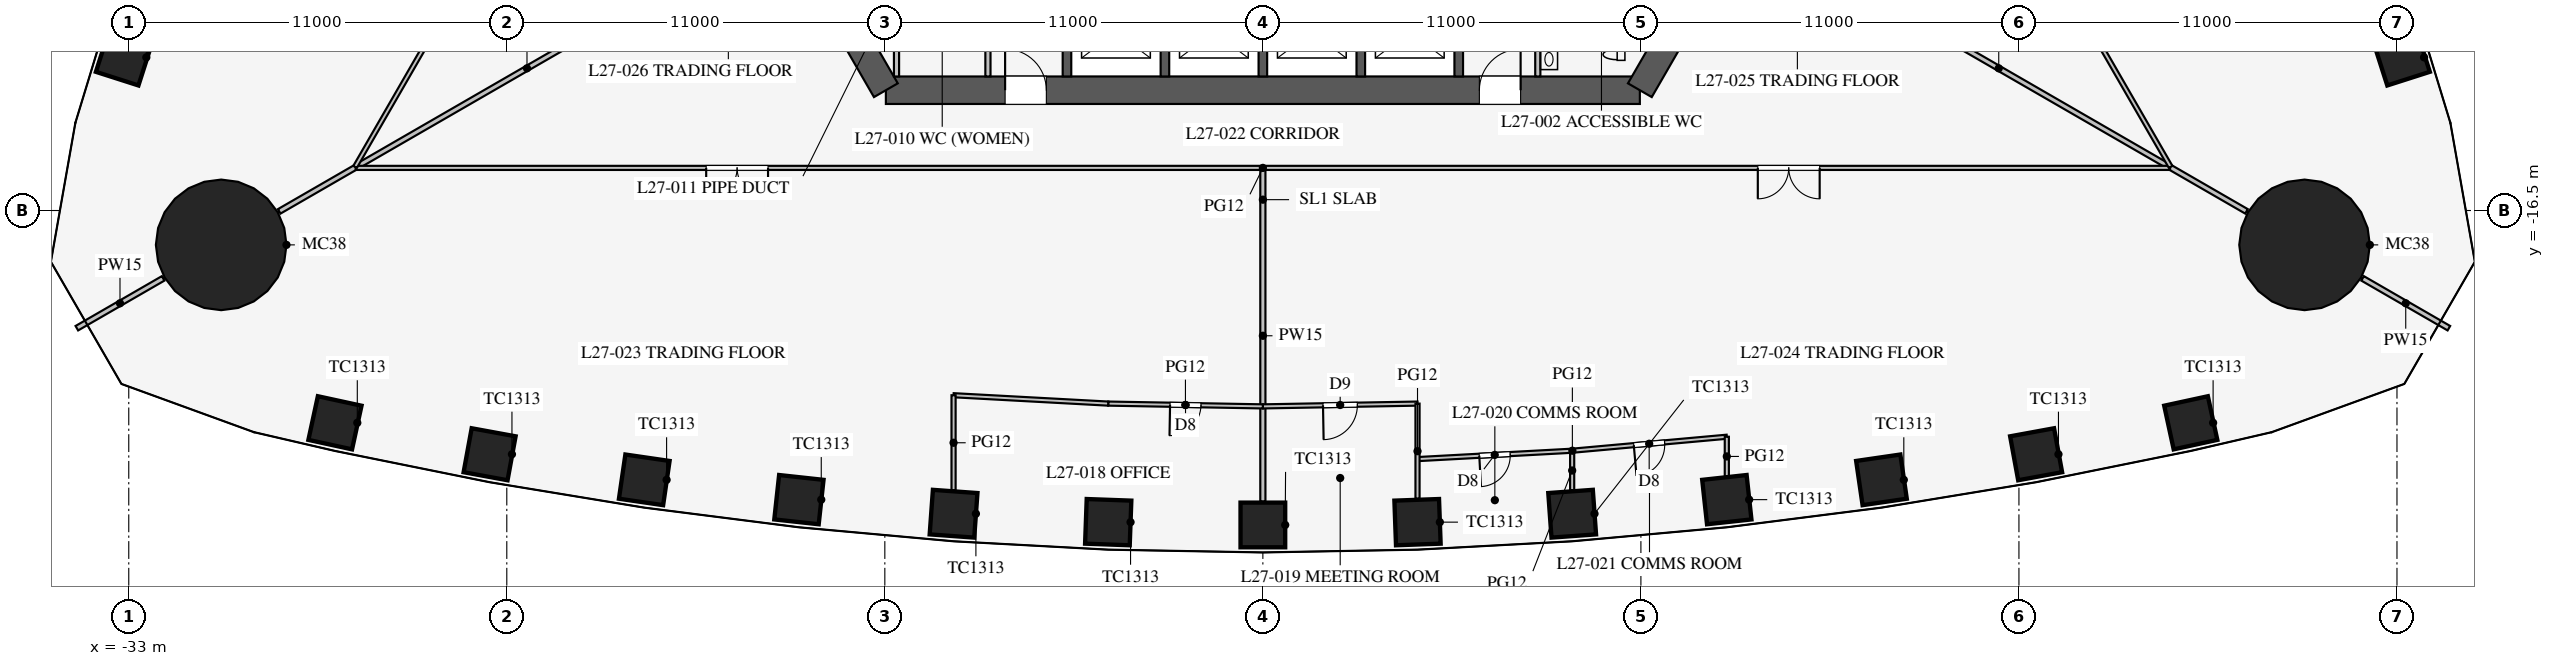
"""IFC4 building model, lengths in metres.
Left out: names, types, materials, properties, quantities, classifications, styles, units other than length and angle.
Written with IfcOpenShell. Run it as: python <this file> out.ifc"""

import sys

from ifc_helpers import new_model, si_unit, direction, frame, frame_2d, origin, origin_2d, place, context, subcontext, project, spatial, rectangle, circle, extrude, element, fill, save


model = new_model("IFC4")
c1 = context("Model", 3, precision=1e-05, world=origin(), true_north=direction((0.0, 1.0)))
c2 = subcontext(c1, "Body", "Model", "MODEL_VIEW")
j1 = project(units=[si_unit("LENGTHUNIT", "METRE"), si_unit("PLANEANGLEUNIT", "RADIAN")], contexts=[c1])
p1 = place(None, origin())
s1 = spatial("IfcSite", under=j1, at=p1, CompositionType="ELEMENT")
p2 = place(p1, origin())
s2 = spatial("IfcBuilding", under=s1, at=p2, CompositionType="ELEMENT")
p3 = place(p2, frame((0.0, 0.0, 119.9)))
s3 = spatial("IfcBuildingStorey", under=s2, at=p3, CompositionType="ELEMENT", Elevation=119.9)
for number, where, z_axis, x_axis in (
    (1, (-27.0, -22.677, 0.0), (0.0, 0.0, 1.0), (0.977, -0.212, 0.0)),
    (2, (-22.5, -23.593, 0.0), (0.0, 0.0, 1.0), (0.984, -0.18, 0.0)),
    (3, (-18.0, -24.337, 0.0), (0.0, 0.0, 1.0), (0.99, -0.144, 0.0)),
    (4, (-13.5, -24.913, 0.0), (0.0, 0.0, 1.0), (0.994, -0.108, 0.0)),
    (5, (-9.0, -25.323, 0.0), (0.0, 0.0, 1.0), (0.997, -0.072, 0.0)),
    (6, (-4.5, -25.568, 0.0), (0.0, 0.0, 1.0), (0.999, -0.036, 0.0)),
    (7, (0.0, -25.65, 0.0), (0.0, 0.0, 1.0), (1.0, 0.0, 0.0)),
    (8, (4.5, -25.568, 0.0), (0.0, 0.0, 1.0), (0.999, 0.036, 0.0)),
    (9, (9.0, -25.323, 0.0), (0.0, 0.0, 1.0), (0.997, 0.072, 0.0)),
    (10, (13.5, -24.913, 0.0), (0.0, 0.0, 1.0), (0.994, 0.108, 0.0)),
    (11, (18.0, -24.337, 0.0), (0.0, 0.0, 1.0), (0.99, 0.144, 0.0)),
    (12, (22.5, -23.593, 0.0), (0.0, 0.0, 1.0), (0.984, 0.18, 0.0)),
    (13, (27.0, -22.677, 0.0), (0.0, 0.0, 1.0), (0.977, 0.212, 0.0)),
    (14, (33.139, -12.044, 0.0), (0.0, 0.0, 1.0), (-0.305, 0.952, 0.0)),
    (15, (-33.139, -12.044, 0.0), (0.0, 0.0, 1.0), (-0.305, -0.952, 0.0)),
):
    element("IfcColumn", number, at=place(p3, frame(where, z_axis=z_axis, x_axis=x_axis)), inside=s3, PredefinedType="COLUMN", context=c2, shape_type="SweptSolid", body=[
        extrude(rectangle(XDim=1.3, YDim=1.3, at=origin_2d()), origin(), (0.0, 0.0, 1.0), 4.2),
    ])
for number, where, z_axis, x_axis in (
    (16, (30.311, -17.5, 0.0), (0.0, 0.0, 1.0), (1.0, 0.0, 0.0)),
    (17, (-30.311, -17.5, 0.0), (0.0, 0.0, 1.0), (1.0, 0.0, 0.0)),
):
    element("IfcColumn", number, at=place(p3, frame(where, z_axis=z_axis, x_axis=x_axis)), inside=s3, PredefinedType="COLUMN", context=c2, shape_type="SweptSolid", body=[
        extrude(circle(Radius=1.9, at=origin_2d()), origin(), (0.0, 0.0, 1.0), 4.2),
    ])
p4 = place(p3, frame((-10.97, -13.0, 0.0), z_axis=(0.0, 0.0, 1.0), x_axis=(1.0, 0.0, 0.0)))
e18 = element("IfcWall", 18, at=p4, inside=s3, PredefinedType="SHEAR", context=c2, shape_type="SweptSolid", body=[
    extrude(rectangle(XDim=21.939, YDim=0.8, at=frame_2d((10.97, 0.0))), origin(), (0.0, 0.0, 1.0), 4.2),
])
p5 = place(p4, frame((17.27, 0.0, 0.0)))
e19 = element("IfcOpeningElement", 19, at=p5, cuts=e18, PredefinedType="OPENING", context=c2, shape_type="SweptSolid", body=[
    extrude(rectangle(XDim=1.2, YDim=2.1, at=frame_2d((0.6, 1.05))), frame((0.0, 0.41, 0.0), z_axis=(0.0, -1.0, 0.0), x_axis=(1.0, 0.0, 0.0)), (0.0, 0.0, 1.0), 0.82),
])
p6 = place(p4, frame((3.47, 0.0, 0.0)))
e20 = element("IfcOpeningElement", 20, at=p6, cuts=e18, PredefinedType="OPENING", context=c2, shape_type="SweptSolid", body=[
    extrude(rectangle(XDim=1.2, YDim=2.1, at=frame_2d((0.6, 1.05))), frame((0.0, 0.41, 0.0), z_axis=(0.0, -1.0, 0.0), x_axis=(1.0, 0.0, 0.0)), (0.0, 0.0, 1.0), 0.82),
])
for number, where, z_axis, x_axis in (
    (21, (10.97, -13.0, 0.0), (0.0, 0.0, 1.0), (0.5, 0.866, 0.0)),
    (22, (-16.743, -3.0, 0.0), (0.0, 0.0, 1.0), (0.5, -0.866, 0.0)),
):
    element("IfcWall", number, at=place(p3, frame(where, z_axis=z_axis, x_axis=x_axis)), inside=s3, PredefinedType="SHEAR", context=c2, shape_type="SweptSolid", body=[
        extrude(rectangle(XDim=11.547, YDim=0.8, at=frame_2d((5.773, 0.0))), origin(), (0.0, 0.0, 1.0), 4.2),
    ])
for number, where, z_axis, x_axis in (
    (23, (-5.7, -10.025, 0.0), (0.0, 0.0, 1.0), (0.0, -1.0, 0.0)),
    (24, (-2.85, -10.025, 0.0), (0.0, 0.0, 1.0), (0.0, -1.0, 0.0)),
    (25, (0.0, -10.025, 0.0), (0.0, 0.0, 1.0), (0.0, -1.0, 0.0)),
    (26, (2.85, -10.025, 0.0), (0.0, 0.0, 1.0), (0.0, -1.0, 0.0)),
    (27, (5.7, -10.025, 0.0), (0.0, 0.0, 1.0), (0.0, -1.0, 0.0)),
):
    element("IfcWall", number, at=place(p3, frame(where, z_axis=z_axis, x_axis=x_axis)), inside=s3, PredefinedType="SHEAR", context=c2, shape_type="SweptSolid", body=[
        extrude(rectangle(XDim=2.575, YDim=0.25, at=frame_2d((1.288, 0.0))), origin(), (0.0, 0.0, 1.0), 4.2),
    ])
p7 = place(p3, frame((8.0, -7.5, 0.0), z_axis=(0.0, 0.0, 1.0), x_axis=(0.0, -1.0, 0.0)))
e28 = element("IfcWall", 28, at=p7, inside=s3, PredefinedType="PARTITIONING", context=c2, shape_type="SweptSolid", body=[
    extrude(rectangle(XDim=5.1, YDim=0.15, at=frame_2d((2.55, 0.0))), origin(), (0.0, 0.0, 1.0), 4.0),
])
p8 = place(p7, frame((2.6, 0.0, 0.0)))
e29 = element("IfcOpeningElement", 29, at=p8, cuts=e28, PredefinedType="OPENING", context=c2, shape_type="SweptSolid", body=[
    extrude(rectangle(XDim=0.9, YDim=2.1, at=frame_2d((0.45, 1.05))), frame((0.0, 0.085, 0.0), z_axis=(0.0, -1.0, 0.0), x_axis=(1.0, 0.0, 0.0)), (0.0, 0.0, 1.0), 0.17),
])
p9 = place(p3, frame((-8.0, -7.5, 0.0), z_axis=(0.0, 0.0, 1.0), x_axis=(0.0, -1.0, 0.0)))
e30 = element("IfcWall", 30, at=p9, inside=s3, PredefinedType="PARTITIONING", context=c2, shape_type="SweptSolid", body=[
    extrude(rectangle(XDim=5.1, YDim=0.15, at=frame_2d((2.55, 0.0))), origin(), (0.0, 0.0, 1.0), 4.0),
])
p10 = place(p9, frame((2.6, 0.0, 0.0)))
e31 = element("IfcOpeningElement", 31, at=p10, cuts=e30, PredefinedType="OPENING", context=c2, shape_type="SweptSolid", body=[
    extrude(rectangle(XDim=0.9, YDim=2.1, at=frame_2d((0.45, 1.05))), frame((0.0, 0.085, 0.0), z_axis=(0.0, -1.0, 0.0), x_axis=(1.0, 0.0, 0.0)), (0.0, 0.0, 1.0), 0.17),
])
p11 = place(p3, frame((-10.66, -8.5, 0.0), z_axis=(0.0, 0.0, 1.0), x_axis=(0.0, -1.0, 0.0)))
e32 = element("IfcWall", 32, at=p11, inside=s3, PredefinedType="PARTITIONING", context=c2, shape_type="SweptSolid", body=[
    extrude(rectangle(XDim=4.1, YDim=0.15, at=frame_2d((2.05, 0.0))), origin(), (0.0, 0.0, 1.0), 4.0),
])
p12 = place(p3, frame((14.203, -8.2, 0.0), z_axis=(0.0, 0.0, 1.0), x_axis=(0.866024668836, -0.500001272966, 0.0)))
e33 = element("IfcWall", 33, at=p12, inside=s3, PredefinedType="PARTITIONING", context=c2, shape_type="SweptSolid", body=[
    extrude(rectangle(XDim=16.65, YDim=0.15, at=frame_2d((8.325, 0.0))), origin(), (0.0, 0.0, 1.0), 2.3),
])
p13 = place(p3, frame((32.0, -18.475, 0.0), z_axis=(0.0, 0.0, 1.0), x_axis=(0.866042548026, -0.499970304126, 0.0)))
e34 = element("IfcWall", 34, at=p13, inside=s3, PredefinedType="PARTITIONING", context=c2, shape_type="SweptSolid", body=[
    extrude(rectangle(XDim=2.899, YDim=0.15, at=frame_2d((1.45, 0.0))), origin(), (0.0, 0.0, 1.0), 2.3),
])
p14 = place(p3, frame((-14.203, -8.2, 0.0), z_axis=(0.0, 0.0, 1.0), x_axis=(-0.866024668836, -0.500001272966, 0.0)))
e35 = element("IfcWall", 35, at=p14, inside=s3, PredefinedType="PARTITIONING", context=c2, shape_type="SweptSolid", body=[
    extrude(rectangle(XDim=16.65, YDim=0.15, at=frame_2d((8.325, 0.0))), origin(), (0.0, 0.0, 1.0), 2.3),
])
p15 = place(p3, frame((-32.0, -18.475, 0.0), z_axis=(0.0, 0.0, 1.0), x_axis=(-0.866042548026, -0.499970304126, 0.0)))
e36 = element("IfcWall", 36, at=p15, inside=s3, PredefinedType="PARTITIONING", context=c2, shape_type="SweptSolid", body=[
    extrude(rectangle(XDim=2.899, YDim=0.15, at=frame_2d((1.45, 0.0))), origin(), (0.0, 0.0, 1.0), 2.3),
])
p16 = place(p3, frame((0.0, -15.32, 0.0), z_axis=(0.0, 0.0, 1.0), x_axis=(0.0, -1.0, 0.0)))
e37 = element("IfcWall", 37, at=p16, inside=s3, PredefinedType="PARTITIONING", context=c2, shape_type="SweptSolid", body=[
    extrude(rectangle(XDim=9.65, YDim=0.15, at=frame_2d((4.825, 0.0))), origin(), (0.0, 0.0, 1.0), 3.2),
])
p17 = place(p3, frame((-26.398, -15.26, 0.0), z_axis=(0.0, 0.0, 1.0), x_axis=(1.0, 0.0, 0.0)))
e38 = element("IfcWall", 38, at=p17, inside=s3, PredefinedType="PARTITIONING", context=c2, shape_type="SweptSolid", body=[
    extrude(rectangle(XDim=52.796, YDim=0.12, at=frame_2d((26.398, 0.0))), origin(), (0.0, 0.0, 1.0), 2.9),
])
p18 = place(p17, frame((10.2, 0.0, 0.15)))
e39 = element("IfcOpeningElement", 39, at=p18, cuts=e38, PredefinedType="OPENING", context=c2, shape_type="SweptSolid", body=[
    extrude(rectangle(XDim=1.8, YDim=2.1, at=frame_2d((0.9, 1.05))), frame((0.0, 0.07, 0.0), z_axis=(0.0, -1.0, 0.0), x_axis=(1.0, 0.0, 0.0)), (0.0, 0.0, 1.0), 0.14),
])
p19 = place(p17, frame((40.8, 0.0, 0.15)))
e40 = element("IfcOpeningElement", 40, at=p19, cuts=e38, PredefinedType="OPENING", context=c2, shape_type="SweptSolid", body=[
    extrude(rectangle(XDim=1.8, YDim=2.1, at=frame_2d((0.9, 1.05))), frame((0.0, 0.07, 0.0), z_axis=(0.0, -1.0, 0.0), x_axis=(1.0, 0.0, 0.0)), (0.0, 0.0, 1.0), 0.14),
])
p20 = place(p3, frame((0.0, -22.2, 0.0), z_axis=(0.0, 0.0, 1.0), x_axis=(0.999837820638, 0.018009231578, 0.0)))
e41 = element("IfcWall", 41, at=p20, inside=s3, PredefinedType="PARTITIONING", context=c2, shape_type="SweptSolid", body=[
    extrude(rectangle(XDim=4.501, YDim=0.12, at=frame_2d((2.25, 0.0))), origin(), (0.0, 0.0, 1.0), 2.9),
])
p21 = place(p20, frame((1.75, 0.0, 0.15)))
e42 = element("IfcOpeningElement", 42, at=p21, cuts=e41, PredefinedType="OPENING", context=c2, shape_type="SweptSolid", body=[
    extrude(rectangle(XDim=1.0, YDim=2.1, at=frame_2d((0.5, 1.05))), frame((0.0, 0.07, 0.0), z_axis=(0.0, -1.0, 0.0), x_axis=(1.0, 0.0, 0.0)), (0.0, 0.0, 1.0), 0.14),
])
p22 = place(p3, frame((4.5, -23.734, 0.0), z_axis=(0.0, 0.0, 1.0), x_axis=(0.998537376538, 0.054065771581, 0.0)))
e43 = element("IfcWall", 43, at=p22, inside=s3, PredefinedType="PARTITIONING", context=c2, shape_type="SweptSolid", body=[
    extrude(rectangle(XDim=4.507, YDim=0.12, at=frame_2d((2.253, 0.0))), origin(), (0.0, 0.0, 1.0), 2.9),
])
p23 = place(p22, frame((1.8, 0.0, 0.15)))
e44 = element("IfcOpeningElement", 44, at=p23, cuts=e43, PredefinedType="OPENING", context=c2, shape_type="SweptSolid", body=[
    extrude(rectangle(XDim=0.9, YDim=2.1, at=frame_2d((0.45, 1.05))), frame((0.0, 0.07, 0.0), z_axis=(0.0, -1.0, 0.0), x_axis=(1.0, 0.0, 0.0)), (0.0, 0.0, 1.0), 0.14),
])
p24 = place(p3, frame((9.0, -23.49, 0.0), z_axis=(0.0, 0.0, 1.0), x_axis=(0.995930325215, 0.090126507295, 0.0)))
e45 = element("IfcWall", 45, at=p24, inside=s3, PredefinedType="PARTITIONING", context=c2, shape_type="SweptSolid", body=[
    extrude(rectangle(XDim=4.518, YDim=0.12, at=frame_2d((2.259, 0.0))), origin(), (0.0, 0.0, 1.0), 2.9),
])
p25 = place(p24, frame((1.8, 0.0, 0.15)))
e46 = element("IfcOpeningElement", 46, at=p25, cuts=e45, PredefinedType="OPENING", context=c2, shape_type="SweptSolid", body=[
    extrude(rectangle(XDim=0.9, YDim=2.1, at=frame_2d((0.45, 1.05))), frame((0.0, 0.07, 0.0), z_axis=(0.0, -1.0, 0.0), x_axis=(1.0, 0.0, 0.0)), (0.0, 0.0, 1.0), 0.14),
])
p26 = place(p3, frame((-4.5, -22.119, 0.0), z_axis=(0.0, 0.0, 1.0), x_axis=(0.999837820638, -0.018009231578, 0.0)))
e47 = element("IfcWall", 47, at=p26, inside=s3, PredefinedType="PARTITIONING", context=c2, shape_type="SweptSolid", body=[
    extrude(rectangle(XDim=4.501, YDim=0.12, at=frame_2d((2.25, 0.0))), origin(), (0.0, 0.0, 1.0), 2.9),
])
p27 = place(p26, frame((1.8, 0.0, 0.15)))
e48 = element("IfcOpeningElement", 48, at=p27, cuts=e47, PredefinedType="OPENING", context=c2, shape_type="SweptSolid", body=[
    extrude(rectangle(XDim=0.9, YDim=2.1, at=frame_2d((0.45, 1.05))), frame((0.0, 0.07, 0.0), z_axis=(0.0, -1.0, 0.0), x_axis=(1.0, 0.0, 0.0)), (0.0, 0.0, 1.0), 0.14),
])
p28 = place(p3, frame((-9.0, -21.875, 0.0), z_axis=(0.0, 0.0, 1.0), x_axis=(0.998537376538, -0.054065771581, 0.0)))
e49 = element("IfcWall", 49, at=p28, inside=s3, PredefinedType="PARTITIONING", context=c2, shape_type="SweptSolid", body=[
    extrude(rectangle(XDim=4.507, YDim=0.12, at=frame_2d((2.253, 0.0))), origin(), (0.0, 0.0, 1.0), 2.9),
])
p29 = place(p3, frame((13.5, -23.083, 0.0), z_axis=(0.0, 0.0, 1.0), x_axis=(0.0, -1.0, 0.0)))
e50 = element("IfcWall", 50, at=p29, inside=s3, PredefinedType="PARTITIONING", context=c2, shape_type="SweptSolid", body=[
    extrude(rectangle(XDim=1.146, YDim=0.12, at=frame_2d((0.573, 0.0))), origin(), (0.0, 0.0, 1.0), 2.9),
])
p30 = place(p3, frame((4.5, -22.119, 0.0), z_axis=(0.0, 0.0, 1.0), x_axis=(0.0, -1.0, 0.0)))
e51 = element("IfcWall", 51, at=p30, inside=s3, PredefinedType="PARTITIONING", context=c2, shape_type="SweptSolid", body=[
    extrude(rectangle(XDim=2.769, YDim=0.12, at=frame_2d((1.385, 0.0))), origin(), (0.0, 0.0, 1.0), 2.9),
])
p31 = place(p3, frame((9.0, -23.49, 0.0), z_axis=(0.0, 0.0, 1.0), x_axis=(0.0, -1.0, 0.0)))
e52 = element("IfcWall", 52, at=p31, inside=s3, PredefinedType="PARTITIONING", context=c2, shape_type="SweptSolid", body=[
    extrude(rectangle(XDim=1.151, YDim=0.12, at=frame_2d((0.576, 0.0))), origin(), (0.0, 0.0, 1.0), 2.9),
])
p32 = place(p3, frame((-9.0, -21.875, 0.0), z_axis=(0.0, 0.0, 1.0), x_axis=(0.0, -1.0, 0.0)))
e53 = element("IfcWall", 53, at=p32, inside=s3, PredefinedType="PARTITIONING", context=c2, shape_type="SweptSolid", body=[
    extrude(rectangle(XDim=2.766, YDim=0.12, at=frame_2d((1.383, 0.0))), origin(), (0.0, 0.0, 1.0), 2.9),
])
p33 = place(p3, frame((26.415, -15.231, 0.0), z_axis=(0.0, 0.0, 1.0), x_axis=(-0.50000091641, 0.866024874695, 0.0)))
e54 = element("IfcWall", 54, at=p33, inside=s3, PredefinedType="PARTITIONING", context=c2, shape_type="SweptSolid", body=[
    extrude(rectangle(XDim=52.796, YDim=0.12, at=frame_2d((26.398, 0.0))), origin(), (0.0, 0.0, 1.0), 2.9),
])
p34 = place(p33, frame((10.2, 0.0, 0.15)))
e55 = element("IfcOpeningElement", 55, at=p34, cuts=e54, PredefinedType="OPENING", context=c2, shape_type="SweptSolid", body=[
    extrude(rectangle(XDim=1.8, YDim=2.1, at=frame_2d((0.9, 1.05))), frame((0.0, 0.07, 0.0), z_axis=(0.0, -1.0, 0.0), x_axis=(1.0, 0.0, 0.0)), (0.0, 0.0, 1.0), 0.14),
])
p35 = place(p33, frame((40.8, 0.0, 0.15)))
e56 = element("IfcOpeningElement", 56, at=p35, cuts=e54, PredefinedType="OPENING", context=c2, shape_type="SweptSolid", body=[
    extrude(rectangle(XDim=1.8, YDim=2.1, at=frame_2d((0.9, 1.05))), frame((0.0, 0.07, 0.0), z_axis=(0.0, -1.0, 0.0), x_axis=(1.0, 0.0, 0.0)), (0.0, 0.0, 1.0), 0.14),
])
p36 = place(p3, frame((-0.016, 30.491, 0.0), z_axis=(0.0, 0.0, 1.0), x_axis=(-0.50000091641, -0.866024874695, 0.0)))
e57 = element("IfcWall", 57, at=p36, inside=s3, PredefinedType="PARTITIONING", context=c2, shape_type="SweptSolid", body=[
    extrude(rectangle(XDim=52.796, YDim=0.12, at=frame_2d((26.398, 0.0))), origin(), (0.0, 0.0, 1.0), 2.9),
])
p37 = place(p36, frame((10.2, 0.0, 0.15)))
e58 = element("IfcOpeningElement", 58, at=p37, cuts=e57, PredefinedType="OPENING", context=c2, shape_type="SweptSolid", body=[
    extrude(rectangle(XDim=1.8, YDim=2.1, at=frame_2d((0.9, 1.05))), frame((0.0, 0.07, 0.0), z_axis=(0.0, -1.0, 0.0), x_axis=(1.0, 0.0, 0.0)), (0.0, 0.0, 1.0), 0.14),
])
p38 = place(p36, frame((40.8, 0.0, 0.15)))
e59 = element("IfcOpeningElement", 59, at=p38, cuts=e57, PredefinedType="OPENING", context=c2, shape_type="SweptSolid", body=[
    extrude(rectangle(XDim=1.8, YDim=2.1, at=frame_2d((0.9, 1.05))), frame((0.0, 0.07, 0.0), z_axis=(0.0, -1.0, 0.0), x_axis=(1.0, 0.0, 0.0)), (0.0, 0.0, 1.0), 0.14),
])
p39 = place(p5, origin())
e60 = element("IfcDoor", 60, at=p39, inside=s3, OperationType="SINGLE_SWING_RIGHT", PredefinedType="DOOR", context=c2, shape_type="SweptSolid", body=[
    extrude(rectangle(XDim=1.2, YDim=2.1, at=frame_2d((0.6, 1.05))), frame((0.0, 0.025, 0.0), z_axis=(0.0, -1.0, 0.0), x_axis=(1.0, 0.0, 0.0)), (0.0, 0.0, 1.0), 0.05),
])
fill(e19, e60)
p40 = place(p6, origin())
e61 = element("IfcDoor", 61, at=p40, inside=s3, OperationType="SINGLE_SWING_LEFT", PredefinedType="DOOR", context=c2, shape_type="SweptSolid", body=[
    extrude(rectangle(XDim=1.2, YDim=2.1, at=frame_2d((0.6, 1.05))), frame((0.0, 0.025, 0.0), z_axis=(0.0, -1.0, 0.0), x_axis=(1.0, 0.0, 0.0)), (0.0, 0.0, 1.0), 0.05),
])
fill(e20, e61)
p41 = place(p27, frame((0.9, 0.0, 0.0), z_axis=(0.0, 0.0, 1.0), x_axis=(-1.0, 0.0, 0.0)))
e62 = element("IfcDoor", 62, at=p41, inside=s3, OperationType="SINGLE_SWING_RIGHT", PredefinedType="DOOR", context=c2, shape_type="SweptSolid", body=[
    extrude(rectangle(XDim=0.9, YDim=2.1, at=frame_2d((0.45, 1.05))), frame((0.0, 0.025, 0.0), z_axis=(0.0, -1.0, 0.0), x_axis=(1.0, 0.0, 0.0)), (0.0, 0.0, 1.0), 0.05),
])
fill(e48, e62)
p42 = place(p21, frame((1.0, 0.0, 0.0), z_axis=(0.0, 0.0, 1.0), x_axis=(-1.0, 0.0, 0.0)))
e63 = element("IfcDoor", 63, at=p42, inside=s3, OperationType="SINGLE_SWING_RIGHT", PredefinedType="DOOR", context=c2, shape_type="SweptSolid", body=[
    extrude(rectangle(XDim=1.0, YDim=2.1, at=frame_2d((0.5, 1.05))), frame((0.0, 0.025, 0.0), z_axis=(0.0, -1.0, 0.0), x_axis=(1.0, 0.0, 0.0)), (0.0, 0.0, 1.0), 0.05),
])
fill(e42, e63)
p43 = place(p23, frame((0.9, 0.0, 0.0), z_axis=(0.0, 0.0, 1.0), x_axis=(-1.0, 0.0, 0.0)))
e64 = element("IfcDoor", 64, at=p43, inside=s3, OperationType="SINGLE_SWING_RIGHT", PredefinedType="DOOR", context=c2, shape_type="SweptSolid", body=[
    extrude(rectangle(XDim=0.9, YDim=2.1, at=frame_2d((0.45, 1.05))), frame((0.0, 0.025, 0.0), z_axis=(0.0, -1.0, 0.0), x_axis=(1.0, 0.0, 0.0)), (0.0, 0.0, 1.0), 0.05),
])
fill(e44, e64)
p44 = place(p25, frame((0.9, 0.0, 0.0), z_axis=(0.0, 0.0, 1.0), x_axis=(-1.0, 0.0, 0.0)))
e65 = element("IfcDoor", 65, at=p44, inside=s3, OperationType="SINGLE_SWING_RIGHT", PredefinedType="DOOR", context=c2, shape_type="SweptSolid", body=[
    extrude(rectangle(XDim=0.9, YDim=2.1, at=frame_2d((0.45, 1.05))), frame((0.0, 0.025, 0.0), z_axis=(0.0, -1.0, 0.0), x_axis=(1.0, 0.0, 0.0)), (0.0, 0.0, 1.0), 0.05),
])
fill(e46, e65)
p45 = place(p18, frame((1.8, 0.0, 0.0), z_axis=(0.0, 0.0, 1.0), x_axis=(-1.0, 0.0, 0.0)))
e66 = element("IfcDoor", 66, at=p45, inside=s3, OperationType="DOUBLE_DOOR_SINGLE_SWING", PredefinedType="DOOR", context=c2, shape_type="SweptSolid", body=[
    extrude(rectangle(XDim=1.8, YDim=2.1, at=frame_2d((0.9, 1.05))), frame((0.0, 0.025, 0.0), z_axis=(0.0, -1.0, 0.0), x_axis=(1.0, 0.0, 0.0)), (0.0, 0.0, 1.0), 0.05),
])
fill(e39, e66)
p46 = place(p19, frame((1.8, 0.0, 0.0), z_axis=(0.0, 0.0, 1.0), x_axis=(-1.0, 0.0, 0.0)))
e67 = element("IfcDoor", 67, at=p46, inside=s3, OperationType="DOUBLE_DOOR_SINGLE_SWING", PredefinedType="DOOR", context=c2, shape_type="SweptSolid", body=[
    extrude(rectangle(XDim=1.8, YDim=2.1, at=frame_2d((0.9, 1.05))), frame((0.0, 0.025, 0.0), z_axis=(0.0, -1.0, 0.0), x_axis=(1.0, 0.0, 0.0)), (0.0, 0.0, 1.0), 0.05),
])
fill(e40, e67)
save(model, sys.argv[1])
